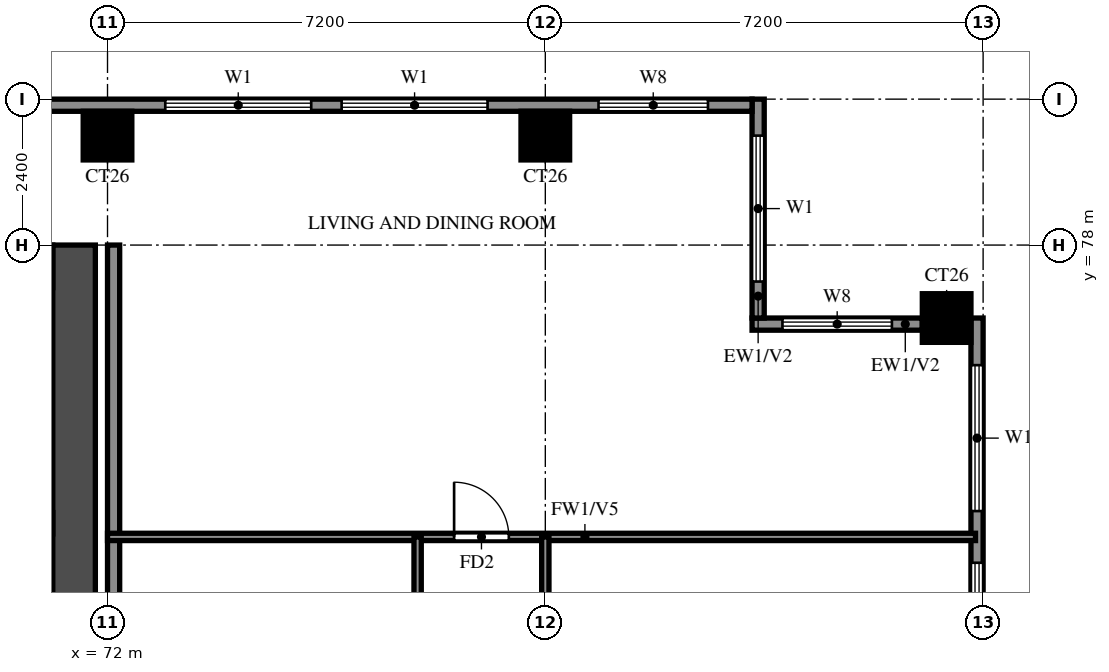
"""IFC4 building model, lengths in metres.
Left out: names, types, materials, properties, quantities, classifications, styles, units other than length and angle.
Written with IfcOpenShell. Run it as: python <this file> out.ifc"""

import sys

from ifc_helpers import new_model, si_unit, direction, frame, frame_2d, origin, origin_2d, place, context, subcontext, project, spatial, rectangle, extrude, source, transform, mapped, element, fill, save


model = new_model("IFC4")
c1 = context("Model", 3, precision=1e-05, world=origin(), true_north=direction((0.0, 1.0)))
c2 = subcontext(c1, "Body", "Model", "MODEL_VIEW")
j1 = project(units=[si_unit("LENGTHUNIT", "METRE"), si_unit("PLANEANGLEUNIT", "RADIAN")], contexts=[c1])
p1 = place(None, origin())
s1 = spatial("IfcSite", under=j1, at=p1, CompositionType="ELEMENT")
p2 = place(p1, origin())
s2 = spatial("IfcBuilding", under=s1, at=p2, CompositionType="ELEMENT")
p3 = place(p2, frame((0.0, 0.0, 195.5)))
s3 = spatial("IfcBuildingStorey", under=s2, at=p3, CompositionType="ELEMENT", Elevation=195.5)
m1 = source(origin(), c2, "Body", "SweptSolid", [
    extrude(rectangle(XDim=0.8, YDim=0.8, at=origin_2d()), origin(), (0.0, 0.0, 1.0), 3.2),
])
for number, where, z_axis, x_axis in (
    (1, (85.8, 76.8, 0.0), (0.0, 0.0, 1.0), (1.0, 0.0, 0.0)),
    (2, (72.0, 79.8, 0.0), (0.0, 0.0, 1.0), (1.0, 0.0, 0.0)),
    (3, (79.2, 79.8, 0.0), (0.0, 0.0, 1.0), (1.0, 0.0, 0.0)),
):
    element("IfcColumn", number, at=place(p3, frame(where, z_axis=z_axis, x_axis=x_axis)), inside=s3, PredefinedType="COLUMN", context=c2, shape_type="MappedRepresentation", body=[
        mapped(m1, transform((0.0, 0.0, 0.0))),
    ])
p4 = place(p3, frame((71.45, 66.1, 0.0), z_axis=(0.0, 0.0, 1.0), x_axis=(0.0, 1.0, 0.0)))
e4 = element("IfcWall", 4, at=p4, inside=s3, PredefinedType="SHEAR", context=c2, shape_type="SweptSolid", body=[
    extrude(rectangle(XDim=11.9, YDim=0.7, at=frame_2d((5.95, 0.0))), origin(), (0.0, 0.0, 1.0), 3.2),
])
p5 = place(p3, frame((29.7, 77.65, 0.0), z_axis=(0.0, 0.0, 1.0), x_axis=(1.0, 0.0, 0.0)))
e5 = element("IfcWall", 5, at=p5, inside=s3, PredefinedType="SHEAR", context=c2, shape_type="SweptSolid", body=[
    extrude(rectangle(XDim=41.4, YDim=0.7, at=frame_2d((20.7, 0.0))), origin(), (0.0, 0.0, 1.0), 3.2),
])
p6 = place(p3, frame((86.3, 48.2, 0.0), z_axis=(0.0, 0.0, 1.0), x_axis=(0.0, 1.0, 0.0)))
e6 = element("IfcWall", 6, at=p6, inside=s3, PredefinedType="SOLIDWALL", context=c2, shape_type="SweptSolid", body=[
    extrude(rectangle(XDim=28.6, YDim=0.2, at=frame_2d((14.3, 0.0))), origin(), (0.0, 0.0, 1.0), 3.2),
])
p7 = place(p6, frame((15.1, 0.0, 0.0)))
e7 = element("IfcOpeningElement", 7, at=p7, cuts=e6, PredefinedType="OPENING", context=c2, shape_type="SweptSolid", body=[
    extrude(rectangle(XDim=1.8, YDim=2.4, at=frame_2d((0.9, 1.2))), frame((0.0, 0.11, 0.0), z_axis=(0.0, -1.0, 0.0), x_axis=(1.0, 0.0, 0.0)), (0.0, 0.0, 1.0), 0.22),
])
p8 = place(p6, frame((0.6, 0.0, 0.6)))
e8 = element("IfcOpeningElement", 8, at=p8, cuts=e6, PredefinedType="OPENING", context=c2, shape_type="SweptSolid", body=[
    extrude(rectangle(XDim=2.4, YDim=2.4, at=frame_2d((1.2, 1.2))), frame((0.0, 0.11, 0.0), z_axis=(0.0, -1.0, 0.0), x_axis=(1.0, 0.0, 0.0)), (0.0, 0.0, 1.0), 0.22),
])
p9 = place(p6, frame((4.575, 0.0, 1.5)))
e9 = element("IfcOpeningElement", 9, at=p9, cuts=e6, PredefinedType="OPENING", context=c2, shape_type="SweptSolid", body=[
    extrude(rectangle(XDim=0.9, YDim=0.9, at=frame_2d((0.45, 0.45))), frame((0.0, 0.11, 0.0), z_axis=(0.0, -1.0, 0.0), x_axis=(1.0, 0.0, 0.0)), (0.0, 0.0, 1.0), 0.22),
])
p10 = place(p6, frame((8.375, 0.0, 0.6)))
e10 = element("IfcOpeningElement", 10, at=p10, cuts=e6, PredefinedType="OPENING", context=c2, shape_type="SweptSolid", body=[
    extrude(rectangle(XDim=2.4, YDim=2.4, at=frame_2d((1.2, 1.2))), frame((0.0, 0.11, 0.0), z_axis=(0.0, -1.0, 0.0), x_axis=(1.0, 0.0, 0.0)), (0.0, 0.0, 1.0), 0.22),
])
p11 = place(p6, frame((12.525, 0.0, 0.6)))
e11 = element("IfcOpeningElement", 11, at=p11, cuts=e6, PredefinedType="OPENING", context=c2, shape_type="SweptSolid", body=[
    extrude(rectangle(XDim=1.2, YDim=2.4, at=frame_2d((0.6, 1.2))), frame((0.0, 0.11, 0.0), z_axis=(0.0, -1.0, 0.0), x_axis=(1.0, 0.0, 0.0)), (0.0, 0.0, 1.0), 0.22),
])
p12 = place(p6, frame((19.575, 0.0, 1.5)))
e12 = element("IfcOpeningElement", 12, at=p12, cuts=e6, PredefinedType="OPENING", context=c2, shape_type="SweptSolid", body=[
    extrude(rectangle(XDim=0.9, YDim=0.9, at=frame_2d((0.45, 0.45))), frame((0.0, 0.11, 0.0), z_axis=(0.0, -1.0, 0.0), x_axis=(1.0, 0.0, 0.0)), (0.0, 0.0, 1.0), 0.22),
])
p13 = place(p6, frame((22.175, 0.0, 0.6)))
e13 = element("IfcOpeningElement", 13, at=p13, cuts=e6, PredefinedType="OPENING", context=c2, shape_type="SweptSolid", body=[
    extrude(rectangle(XDim=2.4, YDim=2.4, at=frame_2d((1.2, 1.2))), frame((0.0, 0.11, 0.0), z_axis=(0.0, -1.0, 0.0), x_axis=(1.0, 0.0, 0.0)), (0.0, 0.0, 1.0), 0.22),
])
p14 = place(p6, frame((25.425, 0.0, 0.6)))
e14 = element("IfcOpeningElement", 14, at=p14, cuts=e6, PredefinedType="OPENING", context=c2, shape_type="SweptSolid", body=[
    extrude(rectangle(XDim=2.4, YDim=2.4, at=frame_2d((1.2, 1.2))), frame((0.0, 0.11, 0.0), z_axis=(0.0, -1.0, 0.0), x_axis=(1.0, 0.0, 0.0)), (0.0, 0.0, 1.0), 0.22),
])
p15 = place(p3, frame((85.4, 76.7, 0.0), z_axis=(0.0, 0.0, 1.0), x_axis=(-1.0, 0.0, 0.0)))
e15 = element("IfcWall", 15, at=p15, inside=s3, PredefinedType="SOLIDWALL", context=c2, shape_type="SweptSolid", body=[
    extrude(rectangle(XDim=2.8, YDim=0.2, at=frame_2d((1.4, 0.0))), origin(), (0.0, 0.0, 1.0), 3.2),
])
p16 = place(p15, frame((0.5, 0.0, 0.6)))
e16 = element("IfcOpeningElement", 16, at=p16, cuts=e15, PredefinedType="OPENING", context=c2, shape_type="SweptSolid", body=[
    extrude(rectangle(XDim=1.8, YDim=2.4, at=frame_2d((0.9, 1.2))), frame((0.0, 0.11, 0.0), z_axis=(0.0, -1.0, 0.0), x_axis=(1.0, 0.0, 0.0)), (0.0, 0.0, 1.0), 0.22),
])
p17 = place(p3, frame((82.7, 76.8, 0.0), z_axis=(0.0, 0.0, 1.0), x_axis=(0.0, 1.0, 0.0)))
e17 = element("IfcWall", 17, at=p17, inside=s3, PredefinedType="SOLIDWALL", context=c2, shape_type="SweptSolid", body=[
    extrude(rectangle(XDim=3.6, YDim=0.2, at=frame_2d((1.8, 0.0))), origin(), (0.0, 0.0, 1.0), 3.2),
])
p18 = place(p17, frame((0.6, 0.0, 0.6)))
e18 = element("IfcOpeningElement", 18, at=p18, cuts=e17, PredefinedType="OPENING", context=c2, shape_type="SweptSolid", body=[
    extrude(rectangle(XDim=2.4, YDim=2.4, at=frame_2d((1.2, 1.2))), frame((0.0, 0.11, 0.0), z_axis=(0.0, -1.0, 0.0), x_axis=(1.0, 0.0, 0.0)), (0.0, 0.0, 1.0), 0.22),
])
p19 = place(p3, frame((82.6, 80.3, 0.0), z_axis=(0.0, 0.0, 1.0), x_axis=(-1.0, 0.0, 0.0)))
e19 = element("IfcWall", 19, at=p19, inside=s3, PredefinedType="SOLIDWALL", context=c2, shape_type="SweptSolid", body=[
    extrude(rectangle(XDim=64.6, YDim=0.2, at=frame_2d((32.3, 0.0))), origin(), (0.0, 0.0, 1.0), 3.2),
])
p20 = place(p19, frame((58.3, 0.0, 0.0)))
e20 = element("IfcOpeningElement", 20, at=p20, cuts=e19, PredefinedType="OPENING", context=c2, shape_type="SweptSolid", body=[
    extrude(rectangle(XDim=1.8, YDim=2.4, at=frame_2d((0.9, 1.2))), frame((0.0, 0.11, 0.0), z_axis=(0.0, -1.0, 0.0), x_axis=(1.0, 0.0, 0.0)), (0.0, 0.0, 1.0), 0.22),
])
p21 = place(p19, frame((54.275, 0.0, 0.6)))
e21 = element("IfcOpeningElement", 21, at=p21, cuts=e19, PredefinedType="OPENING", context=c2, shape_type="SweptSolid", body=[
    extrude(rectangle(XDim=1.8, YDim=2.4, at=frame_2d((0.9, 1.2))), frame((0.0, 0.11, 0.0), z_axis=(0.0, -1.0, 0.0), x_axis=(1.0, 0.0, 0.0)), (0.0, 0.0, 1.0), 0.22),
])
p22 = place(p19, frame((56.95, 0.0, 0.6)))
e22 = element("IfcOpeningElement", 22, at=p22, cuts=e19, PredefinedType="OPENING", context=c2, shape_type="SweptSolid", body=[
    extrude(rectangle(XDim=0.9, YDim=2.4, at=frame_2d((0.45, 1.2))), frame((0.0, 0.11, 0.0), z_axis=(0.0, -1.0, 0.0), x_axis=(1.0, 0.0, 0.0)), (0.0, 0.0, 1.0), 0.22),
])
p23 = place(p19, frame((61.475, 0.0, 0.6)))
e23 = element("IfcOpeningElement", 23, at=p23, cuts=e19, PredefinedType="OPENING", context=c2, shape_type="SweptSolid", body=[
    extrude(rectangle(XDim=1.2, YDim=2.4, at=frame_2d((0.6, 1.2))), frame((0.0, 0.11, 0.0), z_axis=(0.0, -1.0, 0.0), x_axis=(1.0, 0.0, 0.0)), (0.0, 0.0, 1.0), 0.22),
])
p24 = place(p19, frame((0.725, 0.0, 0.6)))
e24 = element("IfcOpeningElement", 24, at=p24, cuts=e19, PredefinedType="OPENING", context=c2, shape_type="SweptSolid", body=[
    extrude(rectangle(XDim=1.8, YDim=2.4, at=frame_2d((0.9, 1.2))), frame((0.0, 0.11, 0.0), z_axis=(0.0, -1.0, 0.0), x_axis=(1.0, 0.0, 0.0)), (0.0, 0.0, 1.0), 0.22),
])
p25 = place(p19, frame((4.35, 0.0, 0.6)))
e25 = element("IfcOpeningElement", 25, at=p25, cuts=e19, PredefinedType="OPENING", context=c2, shape_type="SweptSolid", body=[
    extrude(rectangle(XDim=2.4, YDim=2.4, at=frame_2d((1.2, 1.2))), frame((0.0, 0.11, 0.0), z_axis=(0.0, -1.0, 0.0), x_axis=(1.0, 0.0, 0.0)), (0.0, 0.0, 1.0), 0.22),
])
p26 = place(p19, frame((7.25, 0.0, 0.6)))
e26 = element("IfcOpeningElement", 26, at=p26, cuts=e19, PredefinedType="OPENING", context=c2, shape_type="SweptSolid", body=[
    extrude(rectangle(XDim=2.4, YDim=2.4, at=frame_2d((1.2, 1.2))), frame((0.0, 0.11, 0.0), z_axis=(0.0, -1.0, 0.0), x_axis=(1.0, 0.0, 0.0)), (0.0, 0.0, 1.0), 0.22),
])
p27 = place(p3, frame((72.1, 62.4, 0.0), z_axis=(0.0, 0.0, 1.0), x_axis=(0.0, 1.0, 0.0)))
e27 = element("IfcWall", 27, at=p27, inside=s3, PredefinedType="SOLIDWALL", context=c2, shape_type="SweptSolid", body=[
    extrude(rectangle(XDim=15.6, YDim=0.2, at=frame_2d((7.8, 0.0))), origin(), (0.0, 0.0, 1.0), 3.2),
])
p28 = place(p3, frame((72.0, 73.2, 0.0), z_axis=(0.0, 0.0, 1.0), x_axis=(1.0, 0.0, 0.0)))
e28 = element("IfcWall", 28, at=p28, inside=s3, PredefinedType="PARTITIONING", context=c2, shape_type="SweptSolid", body=[
    extrude(rectangle(XDim=14.275, YDim=0.12, at=frame_2d((7.137, 0.0))), origin(), (0.0, 0.0, 1.0), 2.3),
])
p29 = place(p28, frame((5.7, 0.0, 0.0)))
e29 = element("IfcOpeningElement", 29, at=p29, cuts=e28, PredefinedType="OPENING", context=c2, shape_type="SweptSolid", body=[
    extrude(rectangle(XDim=0.9, YDim=2.1, at=frame_2d((0.45, 1.05))), frame((0.0, 0.07, 0.0), z_axis=(0.0, -1.0, 0.0), x_axis=(1.0, 0.0, 0.0)), (0.0, 0.0, 1.0), 0.14),
])
p30 = place(p3, frame((77.1, 64.8, 0.0), z_axis=(0.0, 0.0, 1.0), x_axis=(0.0, 1.0, 0.0)))
e30 = element("IfcWall", 30, at=p30, inside=s3, PredefinedType="PARTITIONING", context=c2, shape_type="SweptSolid", body=[
    extrude(rectangle(XDim=8.4, YDim=0.12, at=frame_2d((4.2, 0.0))), origin(), (0.0, 0.0, 1.0), 3.2),
])
p31 = place(p30, frame((6.125, 0.0, 0.0)))
e31 = element("IfcOpeningElement", 31, at=p31, cuts=e30, PredefinedType="OPENING", context=c2, shape_type="SweptSolid", body=[
    extrude(rectangle(XDim=0.8, YDim=2.1, at=frame_2d((0.4, 1.05))), frame((0.0, 0.07, 0.0), z_axis=(0.0, -1.0, 0.0), x_axis=(1.0, 0.0, 0.0)), (0.0, 0.0, 1.0), 0.14),
])
p32 = place(p3, frame((79.2, 69.6, 0.0), z_axis=(0.0, 0.0, 1.0), x_axis=(0.0, 1.0, 0.0)))
e32 = element("IfcWall", 32, at=p32, inside=s3, PredefinedType="PARTITIONING", context=c2, shape_type="SweptSolid", body=[
    extrude(rectangle(XDim=3.6, YDim=0.12, at=frame_2d((1.8, 0.0))), origin(), (0.0, 0.0, 1.0), 3.2),
])
p33 = place(p32, frame((1.35, 0.0, 0.0)))
e33 = element("IfcOpeningElement", 33, at=p33, cuts=e32, PredefinedType="OPENING", context=c2, shape_type="SweptSolid", body=[
    extrude(rectangle(XDim=0.9, YDim=2.1, at=frame_2d((0.45, 1.05))), frame((0.0, 0.07, 0.0), z_axis=(0.0, -1.0, 0.0), x_axis=(1.0, 0.0, 0.0)), (0.0, 0.0, 1.0), 0.14),
])
p34 = place(p13, origin())
e34 = element("IfcWindow", 34, at=p34, inside=s3, PartitioningType="DOUBLE_PANEL_VERTICAL", PredefinedType="WINDOW", context=c2, shape_type="SweptSolid", body=[
    extrude(rectangle(XDim=2.4, YDim=2.4, at=frame_2d((1.2, 1.2))), frame((0.0, 0.03, 0.0), z_axis=(0.0, -1.0, 0.0), x_axis=(1.0, 0.0, 0.0)), (0.0, 0.0, 1.0), 0.06),
])
fill(e13, e34)
p35 = place(p14, origin())
e35 = element("IfcWindow", 35, at=p35, inside=s3, PartitioningType="DOUBLE_PANEL_VERTICAL", PredefinedType="WINDOW", context=c2, shape_type="SweptSolid", body=[
    extrude(rectangle(XDim=2.4, YDim=2.4, at=frame_2d((1.2, 1.2))), frame((0.0, 0.03, 0.0), z_axis=(0.0, -1.0, 0.0), x_axis=(1.0, 0.0, 0.0)), (0.0, 0.0, 1.0), 0.06),
])
fill(e14, e35)
p36 = place(p16, origin())
e36 = element("IfcWindow", 36, at=p36, inside=s3, PartitioningType="DOUBLE_PANEL_VERTICAL", PredefinedType="WINDOW", context=c2, shape_type="SweptSolid", body=[
    extrude(rectangle(XDim=1.8, YDim=2.4, at=frame_2d((0.9, 1.2))), frame((0.0, 0.03, 0.0), z_axis=(0.0, -1.0, 0.0), x_axis=(1.0, 0.0, 0.0)), (0.0, 0.0, 1.0), 0.06),
])
fill(e16, e36)
p37 = place(p18, origin())
e37 = element("IfcWindow", 37, at=p37, inside=s3, PartitioningType="DOUBLE_PANEL_VERTICAL", PredefinedType="WINDOW", context=c2, shape_type="SweptSolid", body=[
    extrude(rectangle(XDim=2.4, YDim=2.4, at=frame_2d((1.2, 1.2))), frame((0.0, 0.03, 0.0), z_axis=(0.0, -1.0, 0.0), x_axis=(1.0, 0.0, 0.0)), (0.0, 0.0, 1.0), 0.06),
])
fill(e18, e37)
p38 = place(p24, origin())
e38 = element("IfcWindow", 38, at=p38, inside=s3, PartitioningType="DOUBLE_PANEL_VERTICAL", PredefinedType="WINDOW", context=c2, shape_type="SweptSolid", body=[
    extrude(rectangle(XDim=1.8, YDim=2.4, at=frame_2d((0.9, 1.2))), frame((0.0, 0.03, 0.0), z_axis=(0.0, -1.0, 0.0), x_axis=(1.0, 0.0, 0.0)), (0.0, 0.0, 1.0), 0.06),
])
fill(e24, e38)
p39 = place(p25, origin())
e39 = element("IfcWindow", 39, at=p39, inside=s3, PartitioningType="DOUBLE_PANEL_VERTICAL", PredefinedType="WINDOW", context=c2, shape_type="SweptSolid", body=[
    extrude(rectangle(XDim=2.4, YDim=2.4, at=frame_2d((1.2, 1.2))), frame((0.0, 0.03, 0.0), z_axis=(0.0, -1.0, 0.0), x_axis=(1.0, 0.0, 0.0)), (0.0, 0.0, 1.0), 0.06),
])
fill(e25, e39)
p40 = place(p26, origin())
e40 = element("IfcWindow", 40, at=p40, inside=s3, PartitioningType="DOUBLE_PANEL_VERTICAL", PredefinedType="WINDOW", context=c2, shape_type="SweptSolid", body=[
    extrude(rectangle(XDim=2.4, YDim=2.4, at=frame_2d((1.2, 1.2))), frame((0.0, 0.03, 0.0), z_axis=(0.0, -1.0, 0.0), x_axis=(1.0, 0.0, 0.0)), (0.0, 0.0, 1.0), 0.06),
])
fill(e26, e40)
p41 = place(p29, origin())
e41 = element("IfcDoor", 41, at=p41, inside=s3, OperationType="SINGLE_SWING_LEFT", PredefinedType="DOOR", context=c2, shape_type="SweptSolid", body=[
    extrude(rectangle(XDim=0.9, YDim=2.1, at=frame_2d((0.45, 1.05))), frame((0.0, 0.025, 0.0), z_axis=(0.0, -1.0, 0.0), x_axis=(1.0, 0.0, 0.0)), (0.0, 0.0, 1.0), 0.05),
])
fill(e29, e41)
save(model, sys.argv[1])
